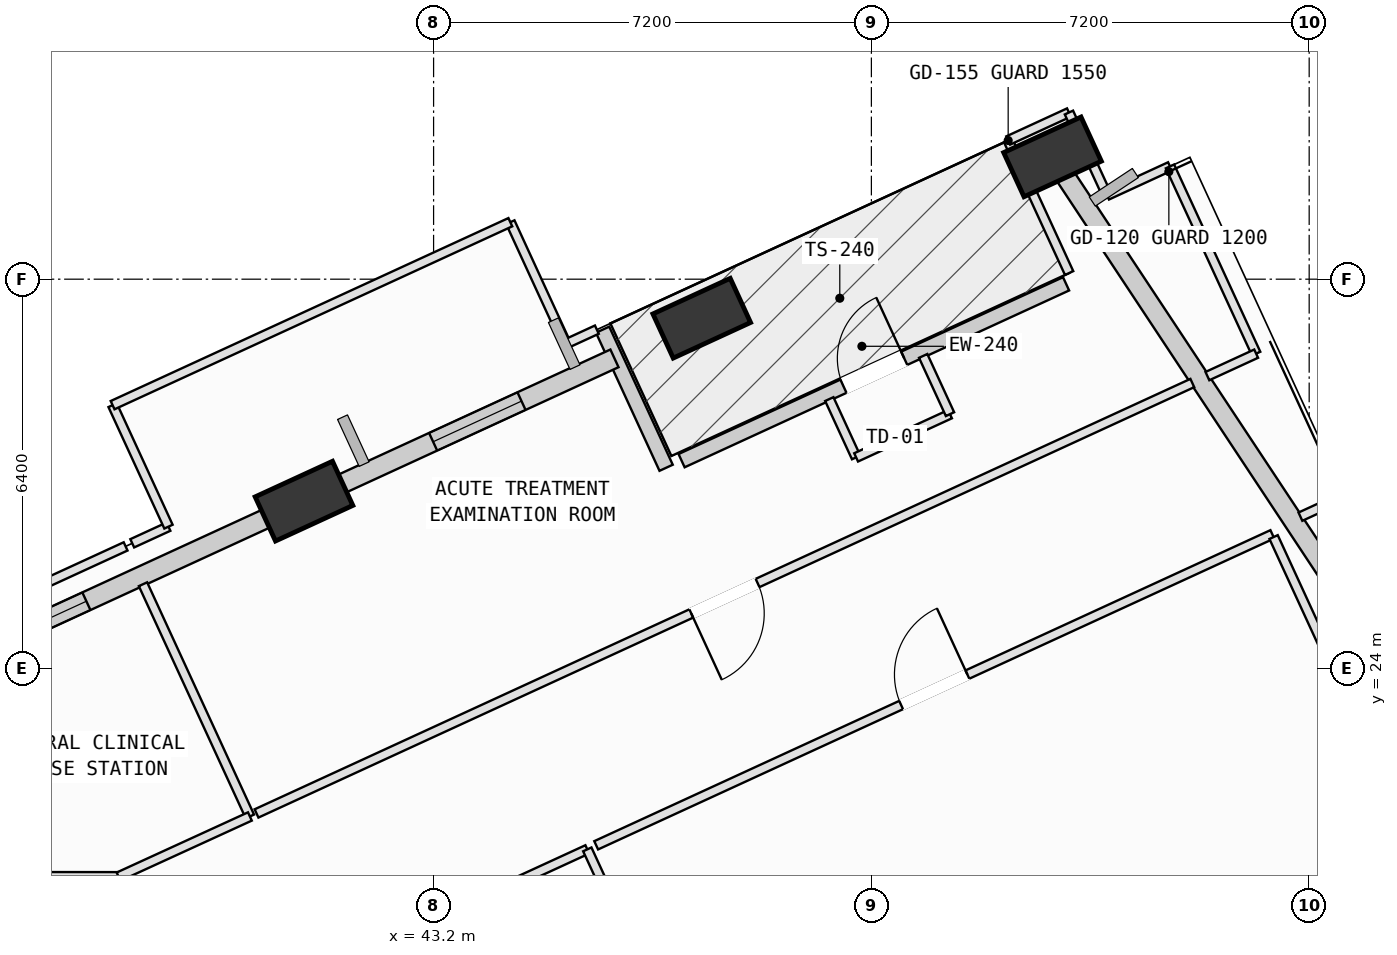
"""IFC4 building model, lengths in metres.
Left out: names, types, materials, properties, quantities, classifications, styles, units other than length and angle.
Written with IfcOpenShell. Run it as: python <this file> out.ifc"""

import sys

from ifc_helpers import new_model, si_unit, direction, frame, frame_2d, origin, origin_2d, place, context, subcontext, project, spatial, rectangle, extrude, element, fill, save


model = new_model("IFC4")
c1 = context("Model", 3, precision=1e-05, world=origin(), true_north=direction((0.0, 1.0)))
c2 = subcontext(c1, "Body", "Model", "MODEL_VIEW")
j1 = project(units=[si_unit("LENGTHUNIT", "METRE"), si_unit("PLANEANGLEUNIT", "RADIAN")], contexts=[c1])
p1 = place(None, origin())
s1 = spatial("IfcSite", under=j1, at=p1, CompositionType="ELEMENT")
p2 = place(p1, origin())
s2 = spatial("IfcBuilding", under=s1, at=p2, CompositionType="ELEMENT")
p3 = place(p2, frame((0.0, 0.0, 128.4)))
s3 = spatial("IfcBuildingStorey", under=s2, at=p3, CompositionType="ELEMENT", Elevation=128.4)
p4 = place(p3, frame((53.379, 32.412, 0.002), z_axis=(-0.032071636862, 0.081365803575, 0.996168166585), x_axis=(-0.692570659496, -0.720423674245, 0.036546014718)))
e1 = element("IfcColumn", 1, at=p4, inside=s3, PredefinedType="COLUMN", context=c2, shape_type="SweptSolid", body=[
    extrude(rectangle(XDim=1.4, YDim=0.8, at=origin_2d()), origin(), (0.0, 0.0, 1.0), 4.012),
])
p5 = place(p3, frame((47.61, 29.758, 0.002), z_axis=(-0.021036511453, 0.05780467495, 0.998106249224), x_axis=(-0.711098781528, -0.702622090832, 0.025704481794)))
e2 = element("IfcColumn", 2, at=p5, inside=s3, PredefinedType="COLUMN", context=c2, shape_type="SweptSolid", body=[
    extrude(rectangle(XDim=1.4, YDim=0.8, at=origin_2d()), origin(), (0.0, 0.0, 1.0), 4.004),
])
p6 = place(p3, frame((41.069, 26.749, 0.002), z_axis=(-0.0083651903, 0.030896250305, 0.999487591373), x_axis=(-0.76778425247, -0.640568841892, 0.013375367549)))
e3 = element("IfcColumn", 3, at=p6, inside=s3, PredefinedType="COLUMN", context=c2, shape_type="SweptSolid", body=[
    extrude(rectangle(XDim=1.4, YDim=0.8, at=origin_2d()), origin(), (0.0, 0.0, 1.0), 3.998),
])
p7 = place(p3, frame((47.279, 27.415, 0.0), z_axis=(0.0, 0.0, 1.0), x_axis=(0.90849764427, 0.417889973983, 0.0)))
e4 = element("IfcWall", 4, at=p7, inside=s3, PredefinedType="SOLIDWALL", context=c2, shape_type="SweptSolid", body=[
    extrude(rectangle(XDim=6.96, YDim=0.24, at=frame_2d((3.48, 0.0))), origin(), (0.0, 0.0, 1.0), 2.945),
])
p8 = place(p7, frame((2.93, 0.0, 0.0)))
e5 = element("IfcOpeningElement", 5, at=p8, cuts=e4, PredefinedType="OPENING", context=c2, shape_type="SweptSolid", body=[
    extrude(rectangle(XDim=1.1, YDim=2.15, at=frame_2d((0.55, 1.075))), frame((0.0, 0.13, 0.0), z_axis=(0.0, -1.0, 0.0), x_axis=(1.0, 0.0, 0.0)), (0.0, 0.0, 1.0), 0.26),
])
p9 = place(p3, frame((45.98, 29.569, 0.0), z_axis=(0.0, 0.0, 1.0), x_axis=(0.417874979305, -0.908504541359, 0.0)))
e6 = element("IfcWall", 6, at=p9, inside=s3, PredefinedType="SOLIDWALL", context=c2, shape_type="SweptSolid", body=[
    extrude(rectangle(XDim=2.5, YDim=0.24, at=frame_2d((1.25, 0.0))), origin(), (0.0, 0.0, 1.0), 3.165),
])
p10 = place(p3, frame((53.557, 32.142, 0.0), z_axis=(0.0, 0.0, 1.0), x_axis=(0.551777055877, -0.833991654999, 0.0)))
e7 = element("IfcWall", 7, at=p10, inside=s3, PredefinedType="SOLIDWALL", context=c2, shape_type="SweptSolid", body=[
    extrude(rectangle(XDim=8.838, YDim=0.32, at=frame_2d((4.419, 0.0))), origin(), (0.0, 0.0, 1.0), 3.165),
])
p11 = place(p3, frame((41.526, 26.959, 0.0), z_axis=(0.0, 0.0, 1.0), x_axis=(0.908514361861, 0.417853627832, 0.0)))
e8 = element("IfcWall", 8, at=p11, inside=s3, PredefinedType="SOLIDWALL", context=c2, shape_type="SweptSolid", body=[
    extrude(rectangle(XDim=5.117, YDim=0.32, at=frame_2d((2.559, 0.0))), origin(), (0.0, 0.0, 1.0), 3.145),
])
p12 = place(p11, frame((1.835, 0.0, 0.75)))
e9 = element("IfcOpeningElement", 9, at=p12, cuts=e8, PredefinedType="OPENING", context=c2, shape_type="SweptSolid", body=[
    extrude(rectangle(XDim=1.6, YDim=1.95, at=frame_2d((0.8, 0.975))), frame((0.0, 0.17, 0.0), z_axis=(0.0, -1.0, 0.0), x_axis=(1.0, 0.0, 0.0)), (0.0, 0.0, 1.0), 0.34),
])
p13 = place(p3, frame((34.989, 23.953, 0.0), z_axis=(0.0, 0.0, 1.0), x_axis=(0.908505077116, 0.417873814512, 0.0)))
e10 = element("IfcWall", 10, at=p13, inside=s3, PredefinedType="SOLIDWALL", context=c2, shape_type="SweptSolid", body=[
    extrude(rectangle(XDim=6.211, YDim=0.32, at=frame_2d((3.105, 0.0))), origin(), (0.0, 0.0, 1.0), 3.165),
])
p14 = place(p13, frame((0.753, 0.0, 0.75)))
e11 = element("IfcOpeningElement", 11, at=p14, cuts=e10, PredefinedType="OPENING", context=c2, shape_type="SweptSolid", body=[
    extrude(rectangle(XDim=2.0, YDim=1.95, at=frame_2d((1.0, 0.975))), frame((0.0, 0.17, 0.0), z_axis=(0.0, -1.0, 0.0), x_axis=(1.0, 0.0, 0.0)), (0.0, 0.0, 1.0), 0.34),
])
p15 = place(p3, frame((36.5, 16.778, 0.0), z_axis=(0.0, 0.0, 1.0), x_axis=(0.908527682077, 0.417824665261, 0.0)))
e12 = element("IfcWall", 12, at=p15, inside=s3, PredefinedType="PARTITIONING", context=c2, shape_type="SweptSolid", body=[
    extrude(rectangle(XDim=10.157, YDim=0.15, at=frame_2d((5.079, 0.0))), origin(), (0.0, 0.0, 1.0), 2.965),
])
p16 = place(p15, frame((4.479, 0.0, 0.0)))
e13 = element("IfcOpeningElement", 13, at=p16, cuts=e12, PredefinedType="OPENING", context=c2, shape_type="SweptSolid", body=[
    extrude(rectangle(XDim=1.2, YDim=2.15, at=frame_2d((0.6, 1.075))), frame((0.0, 0.085, 0.0), z_axis=(0.0, -1.0, 0.0), x_axis=(1.0, 0.0, 0.0)), (0.0, 0.0, 1.0), 0.17),
])
p17 = place(p3, frame((45.728, 21.022, 0.0), z_axis=(0.0, 0.0, 1.0), x_axis=(0.417861501893, -0.908510740297, 0.0)))
e14 = element("IfcWall", 14, at=p17, inside=s3, PredefinedType="PARTITIONING", context=c2, shape_type="SweptSolid", body=[
    extrude(rectangle(XDim=13.615, YDim=0.15, at=frame_2d((6.807, 0.0))), origin(), (0.0, 0.0, 1.0), 3.78),
])
p18 = place(p3, frame((45.874, 21.089, 0.0), z_axis=(0.0, 0.0, 1.0), x_axis=(0.90849514781, 0.417895401273, 0.0)))
e15 = element("IfcWall", 15, at=p18, inside=s3, PredefinedType="PARTITIONING", context=c2, shape_type="SweptSolid", body=[
    extrude(rectangle(XDim=12.24, YDim=0.15, at=frame_2d((6.12, 0.0))), origin(), (0.0, 0.0, 1.0), 3.78),
])
p19 = place(p18, frame((5.52, 0.0, 0.0)))
e16 = element("IfcOpeningElement", 16, at=p19, cuts=e15, PredefinedType="OPENING", context=c2, shape_type="SweptSolid", body=[
    extrude(rectangle(XDim=1.2, YDim=2.15, at=frame_2d((0.6, 1.075))), frame((0.0, 0.085, 0.0), z_axis=(0.0, -1.0, 0.0), x_axis=(1.0, 0.0, 0.0)), (0.0, 0.0, 1.0), 0.17),
])
p20 = place(p3, frame((57.015, 26.159, 0.0), z_axis=(0.0, 0.0, 1.0), x_axis=(0.417893334467, -0.90849609851, 0.0)))
e17 = element("IfcWall", 17, at=p20, inside=s3, PredefinedType="PARTITIONING", context=c2, shape_type="SweptSolid", body=[
    extrude(rectangle(XDim=10.835, YDim=0.15, at=frame_2d((5.418, 0.0))), origin(), (0.0, 0.0, 1.0), 3.78),
])
p21 = place(p3, frame((38.019, 20.573, 0.0), z_axis=(0.0, 0.0, 1.0), x_axis=(-0.999999691191, 0.000785886319, 0.0)))
e18 = element("IfcWall", 18, at=p21, inside=s3, PredefinedType="PARTITIONING", context=c2, shape_type="SweptSolid", body=[
    extrude(rectangle(XDim=9.009, YDim=0.15, at=frame_2d((4.504, 0.0))), origin(), (0.0, 0.0, 1.0), 3.365),
])
p22 = place(p21, frame((3.905, 0.0, 0.0)))
e19 = element("IfcOpeningElement", 19, at=p22, cuts=e18, PredefinedType="OPENING", context=c2, shape_type="SweptSolid", body=[
    extrude(rectangle(XDim=1.2, YDim=2.15, at=frame_2d((0.6, 1.075))), frame((0.0, 0.085, 0.0), z_axis=(0.0, -1.0, 0.0), x_axis=(1.0, 0.0, 0.0)), (0.0, 0.0, 1.0), 0.17),
])
p23 = place(p3, frame((28.483, 21.566, 0.0), z_axis=(0.0, 0.0, 1.0), x_axis=(0.908526220932, 0.417827842393, 0.0)))
e20 = element("IfcWall", 20, at=p23, inside=s3, PredefinedType="PARTITIONING", context=c2, shape_type="SweptSolid", body=[
    extrude(rectangle(XDim=10.624, YDim=0.15, at=frame_2d((5.312, 0.0))), origin(), (0.0, 0.0, 1.0), 3.78),
])
p24 = place(p3, frame((38.421, 25.383, 0.0), z_axis=(0.0, 0.0, 1.0), x_axis=(0.418067562833, -0.908415936071, 0.0)))
e21 = element("IfcWall", 21, at=p24, inside=s3, PredefinedType="PARTITIONING", context=c2, shape_type="SweptSolid", body=[
    extrude(rectangle(XDim=4.205, YDim=0.15, at=frame_2d((2.103, 0.0))), origin(), (0.0, 0.0, 1.0), 3.78),
])
p25 = place(p3, frame((40.179, 21.563, 0.0), z_axis=(0.0, 0.0, 1.0), x_axis=(-0.90905995789, -0.416665324884, 0.0)))
e22 = element("IfcWall", 22, at=p25, inside=s3, PredefinedType="PARTITIONING", context=c2, shape_type="SweptSolid", body=[
    extrude(rectangle(XDim=2.376, YDim=0.15, at=frame_2d((1.188, 0.0))), origin(), (0.0, 0.0, 1.0), 2.945),
])
p26 = place(p3, frame((44.462, 31.337, 0.0), z_axis=(0.0, 0.0, 1.0), x_axis=(0.417770061302, -0.908552792016, 0.0)))
e23 = element("IfcWall", 23, at=p26, inside=s3, PredefinedType="PARTITIONING", context=c2, shape_type="SweptSolid", body=[
    extrude(rectangle(XDim=2.2, YDim=0.15, at=frame_2d((1.1, 0.0))), origin(), (0.0, 0.0, 1.0), 3.78),
])
p27 = place(p3, frame((45.381, 29.338, 0.0), z_axis=(0.0, 0.0, 1.0), x_axis=(0.908229655167, 0.418472094023, 0.0)))
e24 = element("IfcWall", 24, at=p27, inside=s3, PredefinedType="PARTITIONING", context=c2, shape_type="SweptSolid", body=[
    extrude(rectangle(XDim=0.555, YDim=0.15, at=frame_2d((0.277, 0.0))), origin(), (0.0, 0.0, 1.0), 3.145),
])
p28 = place(p3, frame((49.708, 28.428, 0.0), z_axis=(0.0, 0.0, 1.0), x_axis=(0.417737601107, -0.908567717136, 0.0)))
e25 = element("IfcWall", 25, at=p28, inside=s3, PredefinedType="PARTITIONING", context=c2, shape_type="SweptSolid", body=[
    extrude(rectangle(XDim=1.055, YDim=0.15, at=frame_2d((0.528, 0.0))), origin(), (0.0, 0.0, 1.0), 3.78),
])
p29 = place(p3, frame((50.149, 27.469, 0.0), z_axis=(0.0, 0.0, 1.0), x_axis=(0.908354092622, 0.418201915845, 0.0)))
e26 = element("IfcWall", 26, at=p29, inside=s3, PredefinedType="PARTITIONING", context=c2, shape_type="SweptSolid", body=[
    extrude(rectangle(XDim=1.7, YDim=0.15, at=frame_2d((0.85, 0.0))), origin(), (0.0, 0.0, 1.0), 3.78),
])
p30 = place(p3, frame((51.693, 28.18, 0.0), z_axis=(0.0, 0.0, 1.0), x_axis=(-0.418280033039, 0.908318123766, 0.0)))
e27 = element("IfcWall", 27, at=p30, inside=s3, PredefinedType="PARTITIONING", context=c2, shape_type="SweptSolid", body=[
    extrude(rectangle(XDim=1.055, YDim=0.15, at=frame_2d((0.527, 0.0))), origin(), (0.0, 0.0, 1.0), 3.78),
])
p31 = place(p3, frame((53.652, 30.501, 0.0), z_axis=(0.0, 0.0, 1.0), x_axis=(-0.417709073664, 0.908580832826, 0.0)))
e28 = element("IfcWall", 28, at=p31, inside=s3, PredefinedType="PARTITIONING", context=c2, shape_type="SweptSolid", body=[
    extrude(rectangle(XDim=2.399, YDim=0.15, at=frame_2d((1.2, 0.0))), origin(), (0.0, 0.0, 1.0), 3.78),
])
p32 = place(p3, frame((52.65, 32.681, 0.0), z_axis=(0.0, 0.0, 1.0), x_axis=(0.908264475231, 0.418396514127, 0.0)))
e29 = element("IfcWall", 29, at=p32, inside=s3, PredefinedType="PARTITIONING", context=c2, shape_type="SweptSolid", body=[
    extrude(rectangle(XDim=1.1, YDim=0.15, at=frame_2d((0.55, 0.0))), origin(), (0.0, 0.0, 1.0), 2.945),
])
p33 = place(p3, frame((53.649, 33.141, 0.0), z_axis=(0.0, 0.0, 1.0), x_axis=(0.417881432816, -0.90850157298, 0.0)))
e30 = element("IfcWall", 30, at=p33, inside=s3, PredefinedType="PARTITIONING", context=c2, shape_type="SweptSolid", body=[
    extrude(rectangle(XDim=1.5, YDim=0.15, at=frame_2d((0.75, 0.0))), origin(), (0.0, 0.0, 1.0), 3.165),
])
p34 = place(p3, frame((54.276, 31.778, 0.0), z_axis=(0.0, 0.0, 1.0), x_axis=(0.908278877816, 0.418365247258, 0.0)))
e31 = element("IfcWall", 31, at=p34, inside=s3, PredefinedType="PARTITIONING", context=c2, shape_type="SweptSolid", body=[
    extrude(rectangle(XDim=1.14, YDim=0.15, at=frame_2d((0.57, 0.0))), origin(), (0.0, 0.0, 1.0), 3.78),
])
p35 = place(p3, frame((55.311, 32.255, 0.0), z_axis=(0.0, 0.0, 1.0), x_axis=(0.41797098824, -0.908460375025, 0.0)))
e32 = element("IfcWall", 32, at=p35, inside=s3, PredefinedType="PARTITIONING", context=c2, shape_type="SweptSolid", body=[
    extrude(rectangle(XDim=3.39, YDim=0.15, at=frame_2d((1.695, 0.0))), origin(), (0.0, 0.0, 1.0), 3.78),
])
p36 = place(p3, frame((56.728, 29.175, 0.0), z_axis=(0.0, 0.0, 1.0), x_axis=(-0.908395940536, -0.418111008247, 0.0)))
e33 = element("IfcWall", 33, at=p36, inside=s3, PredefinedType="PARTITIONING", context=c2, shape_type="SweptSolid", body=[
    extrude(rectangle(XDim=0.883, YDim=0.15, at=frame_2d((0.441, 0.0))), origin(), (0.0, 0.0, 1.0), 3.78),
])
p37 = place(p3, frame((55.678, 28.692, 0.0), z_axis=(0.0, 0.0, 1.0), x_axis=(-0.908501505358, -0.417881579832, 0.0)))
e34 = element("IfcWall", 34, at=p37, inside=s3, PredefinedType="PARTITIONING", context=c2, shape_type="SweptSolid", body=[
    extrude(rectangle(XDim=16.94, YDim=0.15, at=frame_2d((8.47, 0.0))), origin(), (0.0, 0.0, 1.0), 2.945),
])
p38 = place(p37, frame((7.87, 0.0, 0.0)))
e35 = element("IfcOpeningElement", 35, at=p38, cuts=e34, PredefinedType="OPENING", context=c2, shape_type="SweptSolid", body=[
    extrude(rectangle(XDim=1.2, YDim=2.15, at=frame_2d((0.6, 1.075))), frame((0.0, 0.085, 0.0), z_axis=(0.0, -1.0, 0.0), x_axis=(1.0, 0.0, 0.0)), (0.0, 0.0, 1.0), 0.17),
])
p39 = place(p3, frame((38.244, 26.056, 0.0), z_axis=(0.0, 0.0, 1.0), x_axis=(0.908535648033, 0.417807343465, 0.0)))
e36 = element("IfcWall", 36, at=p39, inside=s3, PredefinedType="PARTITIONING", context=c2, shape_type="SweptSolid", body=[
    extrude(rectangle(XDim=0.656, YDim=0.15, at=frame_2d((0.328, 0.0))), origin(), (0.0, 0.0, 1.0), 3.78),
])
p40 = place(p3, frame((38.84, 26.33, 0.0), z_axis=(0.0, 0.0, 1.0), x_axis=(-0.417980742424, 0.908455887186, 0.0)))
e37 = element("IfcWall", 37, at=p40, inside=s3, PredefinedType="PARTITIONING", context=c2, shape_type="SweptSolid", body=[
    extrude(rectangle(XDim=2.199, YDim=0.15, at=frame_2d((1.1, 0.0))), origin(), (0.0, 0.0, 1.0), 3.78),
])
p41 = place(p3, frame((37.921, 28.328, 0.0), z_axis=(0.0, 0.0, 1.0), x_axis=(0.908481698238, 0.4179246391, 0.0)))
e38 = element("IfcWall", 38, at=p41, inside=s3, PredefinedType="PARTITIONING", context=c2, shape_type="SweptSolid", body=[
    extrude(rectangle(XDim=7.2, YDim=0.15, at=frame_2d((3.6, 0.0))), origin(), (0.0, 0.0, 1.0), 3.78),
])
p42 = place(p3, frame((57.456, 26.494, 0.0), z_axis=(0.0, 0.0, 1.0), x_axis=(0.908560629295, 0.41775301662, 0.0)))
e39 = element("IfcWall", 39, at=p42, inside=s3, PredefinedType="PARTITIONING", context=c2, shape_type="SweptSolid", body=[
    extrude(rectangle(XDim=0.819, YDim=0.15, at=frame_2d((0.409, 0.0))), origin(), (0.0, 0.0, 1.0), 3.78),
])
p43 = place(p8, origin())
e40 = element("IfcDoor", 40, at=p43, inside=s3, OperationType="SINGLE_SWING_RIGHT", PredefinedType="DOOR", context=c2, shape_type="SweptSolid", body=[
    extrude(rectangle(XDim=1.1, YDim=2.15, at=frame_2d((0.55, 1.075))), frame((0.0, 0.025, 0.0), z_axis=(0.0, -1.0, 0.0), x_axis=(1.0, 0.0, 0.0)), (0.0, 0.0, 1.0), 0.05),
])
fill(e5, e40)
p44 = place(p12, origin())
e41 = element("IfcWindow", 41, at=p44, inside=s3, PartitioningType="SINGLE_PANEL", PredefinedType="WINDOW", context=c2, shape_type="SweptSolid", body=[
    extrude(rectangle(XDim=1.6, YDim=1.95, at=frame_2d((0.8, 0.975))), frame((0.0, 0.03, 0.0), z_axis=(0.0, -1.0, 0.0), x_axis=(1.0, 0.0, 0.0)), (0.0, 0.0, 1.0), 0.06),
])
fill(e9, e41)
p45 = place(p14, origin())
e42 = element("IfcWindow", 42, at=p45, inside=s3, PartitioningType="SINGLE_PANEL", PredefinedType="WINDOW", context=c2, shape_type="SweptSolid", body=[
    extrude(rectangle(XDim=2.0, YDim=1.95, at=frame_2d((1.0, 0.975))), frame((0.0, 0.03, 0.0), z_axis=(0.0, -1.0, 0.0), x_axis=(1.0, 0.0, 0.0)), (0.0, 0.0, 1.0), 0.06),
])
fill(e11, e42)
p46 = place(p19, origin())
e43 = element("IfcDoor", 43, at=p46, inside=s3, OperationType="SINGLE_SWING_RIGHT", PredefinedType="DOOR", context=c2, shape_type="SweptSolid", body=[
    extrude(rectangle(XDim=1.2, YDim=2.15, at=frame_2d((0.6, 1.075))), frame((0.0, 0.025, 0.0), z_axis=(0.0, -1.0, 0.0), x_axis=(1.0, 0.0, 0.0)), (0.0, 0.0, 1.0), 0.05),
])
fill(e16, e43)
p47 = place(p38, origin())
e44 = element("IfcDoor", 44, at=p47, inside=s3, OperationType="SINGLE_SWING_RIGHT", PredefinedType="DOOR", context=c2, shape_type="SweptSolid", body=[
    extrude(rectangle(XDim=1.2, YDim=2.15, at=frame_2d((0.6, 1.075))), frame((0.0, 0.025, 0.0), z_axis=(0.0, -1.0, 0.0), x_axis=(1.0, 0.0, 0.0)), (0.0, 0.0, 1.0), 0.05),
])
fill(e35, e44)
save(model, sys.argv[1])
